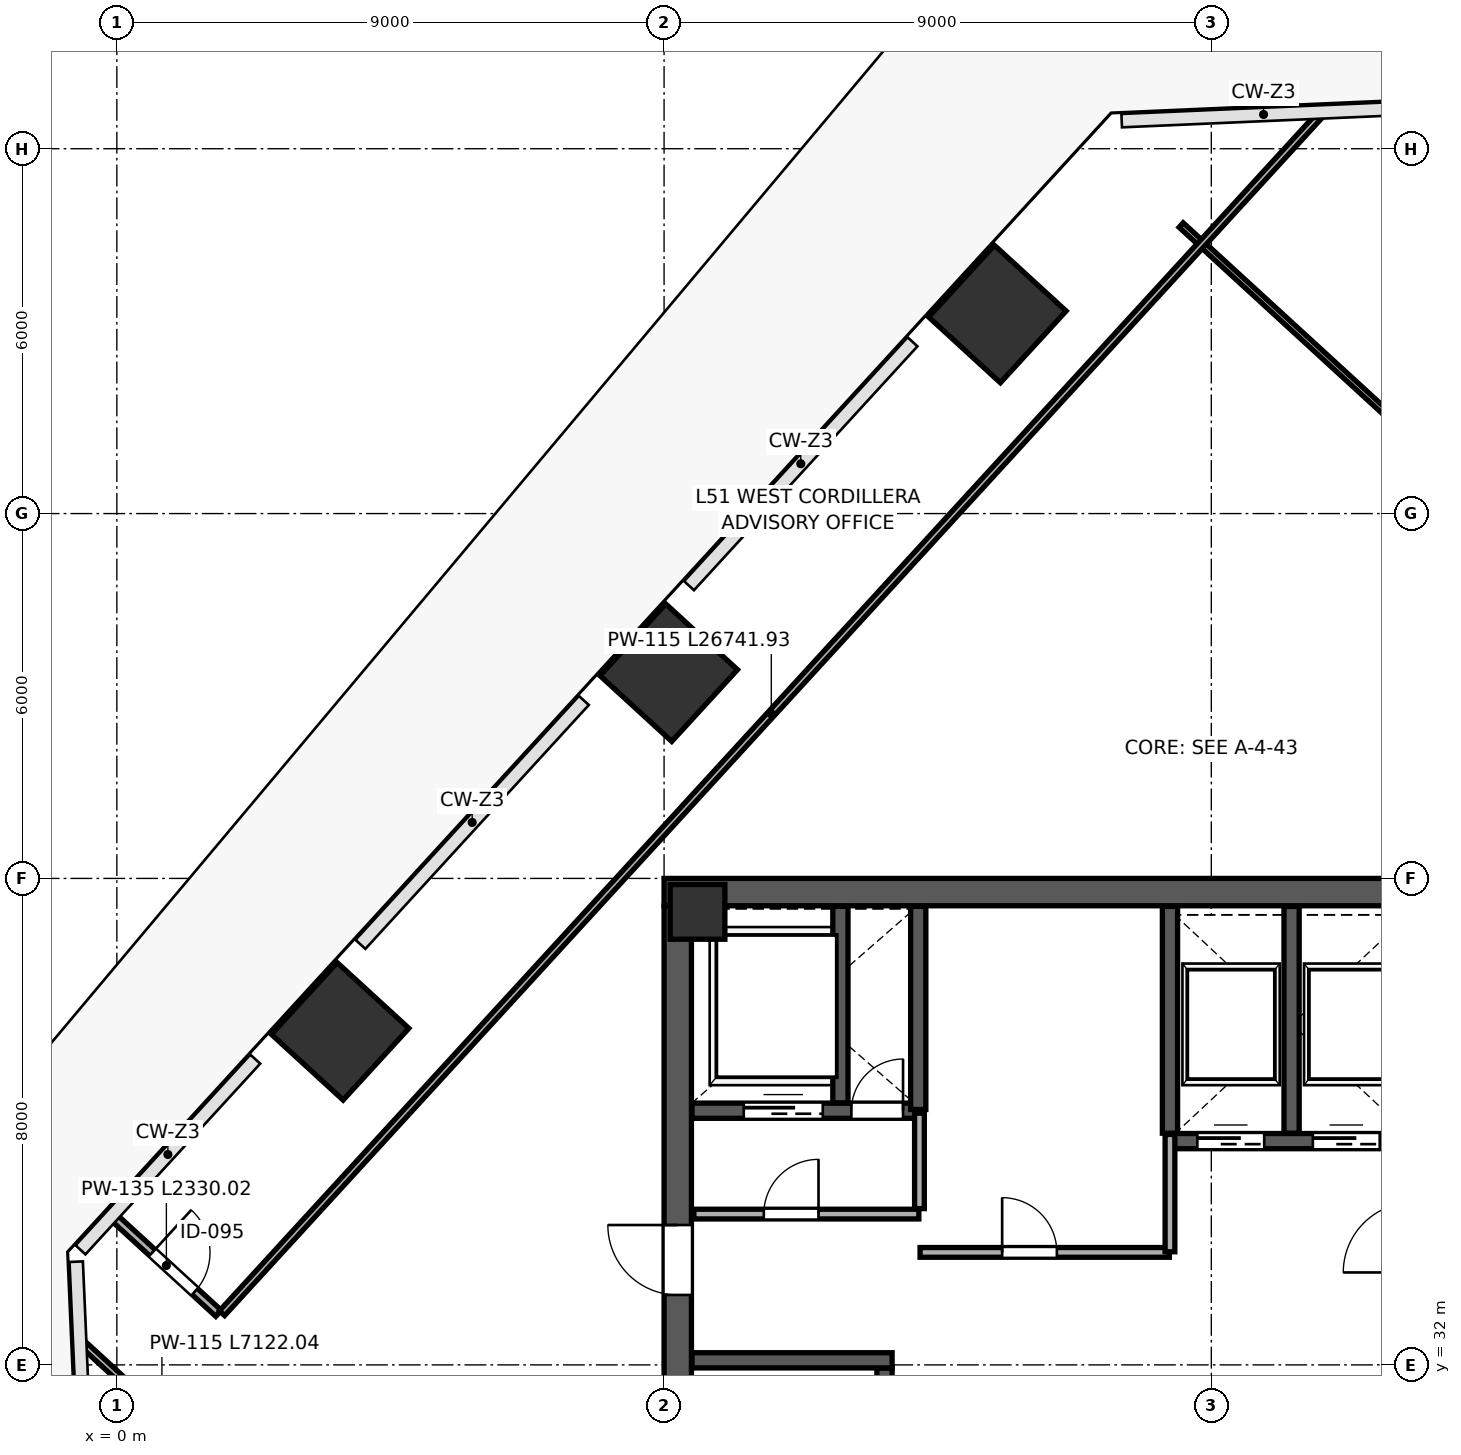
"""IFC4 building model, lengths in metres.
Left out: names, types, materials, properties, quantities, classifications, styles, units other than length and angle.
Written with IfcOpenShell. Run it as: python <this file> out.ifc"""

import sys

from ifc_helpers import new_model, si_unit, direction, frame, frame_2d, origin, origin_2d, place, context, subcontext, project, spatial, rectangle, extrude, source, transform, mapped, element, fill, save


model = new_model("IFC4")
c1 = context("Model", 3, precision=1e-05, world=origin(), true_north=direction((0.0, 1.0)))
c2 = subcontext(c1, "Body", "Model", "MODEL_VIEW")
j1 = project(units=[si_unit("LENGTHUNIT", "METRE"), si_unit("PLANEANGLEUNIT", "RADIAN")], contexts=[c1])
p1 = place(None, origin())
s1 = spatial("IfcSite", under=j1, at=p1, CompositionType="ELEMENT")
p2 = place(p1, origin())
s2 = spatial("IfcBuilding", under=s1, at=p2, CompositionType="ELEMENT")
p3 = place(p2, frame((0.0, 0.0, 229.0)))
s3 = spatial("IfcBuildingStorey", under=s2, at=p3, CompositionType="ELEMENT", Elevation=229.0)
m1 = source(origin(), c2, "Body", "SweptSolid", [
    extrude(rectangle(XDim=0.9, YDim=0.9, at=origin_2d()), origin(), (0.0, 0.0, 1.0), 4.198),
])
p4 = place(p3, frame((9.55, 39.45, 0.001), z_axis=(0.0, 0.0, 1.0), x_axis=(1.0, 0.0, 0.0)))
e1 = element("IfcColumn", 1, at=p4, inside=s3, PredefinedType="COLUMN", context=c2, shape_type="MappedRepresentation", body=[
    mapped(m1, transform((0.0, 0.0, 0.0), scale=1.0)),
])
m2 = source(origin(), c2, "Body", "SweptSolid", [
    extrude(rectangle(XDim=1.6, YDim=1.6, at=origin_2d()), origin(), (0.0, 0.0, 1.0), 4.198),
])
for number, where, z_axis, x_axis in (
    (2, (3.672, 37.486, 0.001), (0.0, 0.0, 1.0), (-0.737, 0.676, 0.0)),
    (3, (9.077, 43.384, 0.001), (0.0, 0.0, 1.0), (-0.737, 0.676, 0.0)),
    (4, (14.482, 49.282, 0.001), (0.0, 0.0, 1.0), (-0.737, 0.676, 0.0)),
):
    element("IfcColumn", number, at=place(p3, frame(where, z_axis=z_axis, x_axis=x_axis)), inside=s3, PredefinedType="COLUMN", context=c2, shape_type="MappedRepresentation", body=[
        mapped(m2, transform((0.0, 0.0, 0.0), scale=1.0)),
    ])
p5 = place(p3, frame((9.225, 24.45, 0.0), z_axis=(0.0, 0.0, 1.0), x_axis=(0.0, 1.0, 0.0)))
e5 = element("IfcWall", 5, at=p5, inside=s3, PredefinedType="SHEAR", context=c2, shape_type="SweptSolid", body=[
    extrude(rectangle(XDim=15.1, YDim=0.45, at=frame_2d((7.55, 0.0))), origin(), (0.0, 0.0, 1.0), 3.96),
])
p6 = place(p5, frame((8.7, 0.0, 0.0)))
e6 = element("IfcOpeningElement", 6, at=p6, cuts=e5, PredefinedType="OPENING", context=c2, shape_type="SweptSolid", body=[
    extrude(rectangle(XDim=1.15, YDim=2.2, at=frame_2d((0.575, 1.1))), frame((0.0, 0.235, 0.0), z_axis=(0.0, -1.0, 0.0), x_axis=(1.0, 0.0, 0.0)), (0.0, 0.0, 1.0), 0.47),
])
p7 = place(p3, frame((9.0, 39.775, 0.0), z_axis=(0.0, 0.0, 1.0), x_axis=(1.0, 0.0, 0.0)))
e7 = element("IfcWall", 7, at=p7, inside=s3, PredefinedType="SHEAR", context=c2, shape_type="SweptSolid", body=[
    extrude(rectangle(XDim=18.0, YDim=0.45, at=frame_2d((9.0, 0.0))), origin(), (0.0, 0.0, 1.0), 3.96),
])
p8 = place(p3, frame((12.625, 24.46, 0.0), z_axis=(0.0, 0.0, 1.0), x_axis=(0.0, 1.0, 0.0)))
e8 = element("IfcWall", 8, at=p8, inside=s3, PredefinedType="SHEAR", context=c2, shape_type="SweptSolid", body=[
    extrude(rectangle(XDim=7.49, YDim=0.25, at=frame_2d((3.745, 0.0))), origin(), (0.0, 0.0, 1.0), 3.96),
])
p9 = place(p8, frame((5.85, 0.0, 0.0)))
e9 = element("IfcOpeningElement", 9, at=p9, cuts=e8, PredefinedType="OPENING", context=c2, shape_type="SweptSolid", body=[
    extrude(rectangle(XDim=1.15, YDim=2.2, at=frame_2d((0.575, 1.1))), frame((0.0, 0.135, 0.0), z_axis=(0.0, -1.0, 0.0), x_axis=(1.0, 0.0, 0.0)), (0.0, 0.0, 1.0), 0.27),
])
p10 = place(p3, frame((9.46, 32.075, 0.0), z_axis=(0.0, 0.0, 1.0), x_axis=(1.0, 0.0, 0.0)))
e10 = element("IfcWall", 10, at=p10, inside=s3, PredefinedType="SHEAR", context=c2, shape_type="SweptSolid", body=[
    extrude(rectangle(XDim=3.29, YDim=0.25, at=frame_2d((1.645, 0.0))), origin(), (0.0, 0.0, 1.0), 3.96),
])
p11 = place(p3, frame((9.46, 36.18, 0.0), z_axis=(0.0, 0.0, 1.0), x_axis=(1.0, 0.0, 0.0)))
e11 = element("IfcWall", 11, at=p11, inside=s3, PredefinedType="SHEAR", context=c2, shape_type="SweptSolid", body=[
    extrude(rectangle(XDim=3.79, YDim=0.25, at=frame_2d((1.895, 0.0))), origin(), (0.0, 0.0, 1.0), 3.96),
])
p12 = place(p11, frame((2.62, 0.0, 0.0)))
e12 = element("IfcOpeningElement", 12, at=p12, cuts=e11, PredefinedType="OPENING", context=c2, shape_type="SweptSolid", body=[
    extrude(rectangle(XDim=0.85, YDim=2.1, at=frame_2d((0.425, 1.05))), frame((0.0, 0.135, 0.0), z_axis=(0.0, -1.0, 0.0), x_axis=(1.0, 0.0, 0.0)), (0.0, 0.0, 1.0), 0.27),
])
p13 = place(p11, frame((0.85, 0.0, 0.0)))
e13 = element("IfcOpeningElement", 13, at=p13, cuts=e11, PredefinedType="OPENING", context=c2, shape_type="SweptSolid", body=[
    extrude(rectangle(XDim=1.3, YDim=2.25, at=frame_2d((0.65, 1.125))), frame((0.0, 0.135, 0.0), z_axis=(0.0, -1.0, 0.0), x_axis=(1.0, 0.0, 0.0)), (0.0, 0.0, 1.0), 0.27),
])
p14 = place(p3, frame((11.9, 36.31, 0.0), z_axis=(0.0, 0.0, 1.0), x_axis=(0.0, 1.0, 0.0)))
e14 = element("IfcWall", 14, at=p14, inside=s3, PredefinedType="SHEAR", context=c2, shape_type="SweptSolid", body=[
    extrude(rectangle(XDim=3.23, YDim=0.25, at=frame_2d((1.615, 0.0))), origin(), (0.0, 0.0, 1.0), 3.96),
])
p15 = place(p3, frame((13.18, 36.2, 0.0), z_axis=(0.0, 0.0, 1.0), x_axis=(0.0, 1.0, 0.0)))
e15 = element("IfcWall", 15, at=p15, inside=s3, PredefinedType="SHEAR", context=c2, shape_type="SweptSolid", body=[
    extrude(rectangle(XDim=3.34, YDim=0.25, at=frame_2d((1.67, 0.0))), origin(), (0.0, 0.0, 1.0), 3.96),
])
p16 = place(p3, frame((17.32, 35.68, 0.0), z_axis=(0.0, 0.0, 1.0), x_axis=(1.0, 0.0, 0.0)))
e16 = element("IfcWall", 16, at=p16, inside=s3, PredefinedType="SHEAR", context=c2, shape_type="SweptSolid", body=[
    extrude(rectangle(XDim=3.87, YDim=0.25, at=frame_2d((1.935, 0.0))), origin(), (0.0, 0.0, 1.0), 3.96),
])
p17 = place(p16, frame((0.45, 0.0, 0.0)))
e17 = element("IfcOpeningElement", 17, at=p17, cuts=e16, PredefinedType="OPENING", context=c2, shape_type="SweptSolid", body=[
    extrude(rectangle(XDim=1.1, YDim=2.2, at=frame_2d((0.55, 1.1))), frame((0.0, 0.135, 0.0), z_axis=(0.0, -1.0, 0.0), x_axis=(1.0, 0.0, 0.0)), (0.0, 0.0, 1.0), 0.27),
])
p18 = place(p16, frame((2.35, 0.0, 0.0)))
e18 = element("IfcOpeningElement", 18, at=p18, cuts=e16, PredefinedType="OPENING", context=c2, shape_type="SweptSolid", body=[
    extrude(rectangle(XDim=1.1, YDim=2.2, at=frame_2d((0.55, 1.1))), frame((0.0, 0.135, 0.0), z_axis=(0.0, -1.0, 0.0), x_axis=(1.0, 0.0, 0.0)), (0.0, 0.0, 1.0), 0.27),
])
for number, where, z_axis, x_axis in (
    (19, (17.32, 35.81, 0.0), (0.0, 0.0, 1.0), (0.0, 1.0, 0.0)),
    (20, (19.32, 35.81, 0.0), (0.0, 0.0, 1.0), (0.0, 1.0, 0.0)),
):
    element("IfcWall", number, at=place(p3, frame(where, z_axis=z_axis, x_axis=x_axis)), inside=s3, PredefinedType="SHEAR", context=c2, shape_type="SweptSolid", body=[
        extrude(rectangle(XDim=3.73, YDim=0.25, at=frame_2d((1.865, 0.0))), origin(), (0.0, 0.0, 1.0), 3.96),
    ])
p19 = place(p3, frame((9.49, 34.48, 0.0), z_axis=(0.0, 0.0, 1.0), x_axis=(1.0, 0.0, 0.0)))
e21 = element("IfcWall", 21, at=p19, inside=s3, PredefinedType="PARTITIONING", context=c2, shape_type="SweptSolid", body=[
    extrude(rectangle(XDim=3.7, YDim=0.16, at=frame_2d((1.85, 0.0))), origin(), (0.0, 0.0, 1.0), 3.96),
])
p20 = place(p19, frame((1.15, 0.0, 0.0)))
e22 = element("IfcOpeningElement", 22, at=p20, cuts=e21, PredefinedType="OPENING", context=c2, shape_type="SweptSolid", body=[
    extrude(rectangle(XDim=0.9, YDim=2.15, at=frame_2d((0.45, 1.075))), frame((0.0, 0.09, 0.0), z_axis=(0.0, -1.0, 0.0), x_axis=(1.0, 0.0, 0.0)), (0.0, 0.0, 1.0), 0.18),
])
p21 = place(p3, frame((13.2, 34.57, 0.0), z_axis=(0.0, 0.0, 1.0), x_axis=(0.0, 1.0, 0.0)))
e23 = element("IfcWall", 23, at=p21, inside=s3, PredefinedType="PARTITIONING", context=c2, shape_type="SweptSolid", body=[
    extrude(rectangle(XDim=1.57, YDim=0.16, at=frame_2d((0.785, 0.0))), origin(), (0.0, 0.0, 1.0), 3.96),
])
p22 = place(p3, frame((13.21, 33.85, 0.0), z_axis=(0.0, 0.0, 1.0), x_axis=(1.0, 0.0, 0.0)))
e24 = element("IfcWall", 24, at=p22, inside=s3, PredefinedType="PARTITIONING", context=c2, shape_type="SweptSolid", body=[
    extrude(rectangle(XDim=4.1, YDim=0.16, at=frame_2d((2.05, 0.0))), origin(), (0.0, 0.0, 1.0), 3.96),
])
p23 = place(p22, frame((1.35, 0.0, 0.0)))
e25 = element("IfcOpeningElement", 25, at=p23, cuts=e24, PredefinedType="OPENING", context=c2, shape_type="SweptSolid", body=[
    extrude(rectangle(XDim=0.9, YDim=2.15, at=frame_2d((0.45, 1.075))), frame((0.0, 0.09, 0.0), z_axis=(0.0, -1.0, 0.0), x_axis=(1.0, 0.0, 0.0)), (0.0, 0.0, 1.0), 0.18),
])
p24 = place(p3, frame((17.32, 33.86, 0.0), z_axis=(0.0, 0.0, 1.0), x_axis=(0.0, 1.0, 0.0)))
e26 = element("IfcWall", 26, at=p24, inside=s3, PredefinedType="PARTITIONING", context=c2, shape_type="SweptSolid", body=[
    extrude(rectangle(XDim=1.93, YDim=0.16, at=frame_2d((0.965, 0.0))), origin(), (0.0, 0.0, 1.0), 3.96),
])
p25 = place(p3, frame((-0.571, 32.354, 0.0), z_axis=(0.0, 0.0, 1.0), x_axis=(0.737285035525, -0.675581805846, 0.0)))
e27 = element("IfcWall", 27, at=p25, inside=s3, PredefinedType="PARTITIONING", context=c2, shape_type="SweptSolid", body=[
    extrude(rectangle(XDim=7.122, YDim=0.115, at=frame_2d((3.561, 0.0))), origin(), (0.0, 0.0, 1.0), 3.96),
])
p26 = place(p25, frame((2.6, 0.0, 0.0)))
e28 = element("IfcOpeningElement", 28, at=p26, cuts=e27, PredefinedType="OPENING", context=c2, shape_type="SweptSolid", body=[
    extrude(rectangle(XDim=0.9, YDim=2.15, at=frame_2d((0.45, 1.075))), frame((0.0, 0.067, 0.0), z_axis=(0.0, -1.0, 0.0), x_axis=(1.0, 0.0, 0.0)), (0.0, 0.0, 1.0), 0.135),
])
p27 = place(p25, frame((4.7, 0.0, 0.0)))
e29 = element("IfcOpeningElement", 29, at=p27, cuts=e27, PredefinedType="OPENING", context=c2, shape_type="SweptSolid", body=[
    extrude(rectangle(XDim=0.95, YDim=2.15, at=frame_2d((0.475, 1.075))), frame((0.0, 0.067, 0.0), z_axis=(0.0, -1.0, 0.0), x_axis=(1.0, 0.0, 0.0)), (0.0, 0.0, 1.0), 0.135),
])
p28 = place(p3, frame((17.504, 50.744, 0.0), z_axis=(0.0, 0.0, 1.0), x_axis=(0.737277850523, -0.675589646996, 0.0)))
e30 = element("IfcWall", 30, at=p28, inside=s3, PredefinedType="PARTITIONING", context=c2, shape_type="SweptSolid", body=[
    extrude(rectangle(XDim=21.87, YDim=0.1, at=frame_2d((10.935, 0.0))), origin(), (0.0, 0.0, 1.0), 3.96),
])
p29 = place(p28, frame((5.4, 0.0, 0.0)))
e31 = element("IfcOpeningElement", 31, at=p29, cuts=e30, PredefinedType="OPENING", context=c2, shape_type="SweptSolid", body=[
    extrude(rectangle(XDim=0.95, YDim=2.15, at=frame_2d((0.475, 1.075))), frame((0.0, 0.06, 0.0), z_axis=(0.0, -1.0, 0.0), x_axis=(1.0, 0.0, 0.0)), (0.0, 0.0, 1.0), 0.12),
])
p30 = place(p3, frame((-0.044, 34.421, 0.0), z_axis=(0.0, 0.0, 1.0), x_axis=(0.73728894688, -0.675577537229, 0.0)))
e32 = element("IfcWall", 32, at=p30, inside=s3, PredefinedType="PARTITIONING", context=c2, shape_type="SweptSolid", body=[
    extrude(rectangle(XDim=2.33, YDim=0.135, at=frame_2d((1.165, 0.0))), origin(), (0.0, 0.0, 1.0), 3.96),
])
p31 = place(p30, frame((0.85, 0.0, 0.0)))
e33 = element("IfcOpeningElement", 33, at=p31, cuts=e32, PredefinedType="OPENING", context=c2, shape_type="SweptSolid", body=[
    extrude(rectangle(XDim=0.95, YDim=2.15, at=frame_2d((0.475, 1.075))), frame((0.0, 0.078, 0.0), z_axis=(0.0, -1.0, 0.0), x_axis=(1.0, 0.0, 0.0)), (0.0, 0.0, 1.0), 0.155),
])
p32 = place(p3, frame((1.73, 32.85, 0.0), z_axis=(0.0, 0.0, 1.0), x_axis=(0.675589845589, 0.737277668546, 0.0)))
e34 = element("IfcWall", 34, at=p32, inside=s3, PredefinedType="PARTITIONING", context=c2, shape_type="SweptSolid", body=[
    extrude(rectangle(XDim=26.742, YDim=0.115, at=frame_2d((13.371, 0.0))), origin(), (0.0, 0.0, 1.0), 3.96),
])
m3 = source(origin(), c2, "Body", "SweptSolid", [
    extrude(rectangle(XDim=1.15, YDim=2.2, at=frame_2d((0.575, 1.1))), frame((0.0, 0.025, 0.0), z_axis=(0.0, -1.0, 0.0), x_axis=(1.0, 0.0, 0.0)), (0.0, 0.0, 1.0), 0.05),
])
p33 = place(p6, origin())
e35 = element("IfcDoor", 35, at=p33, inside=s3, OperationType="SINGLE_SWING_RIGHT", PredefinedType="DOOR", context=c2, shape_type="MappedRepresentation", body=[
    mapped(m3, transform((0.0, 0.0, 0.0), scale=1.0)),
])
fill(e6, e35)
m4 = source(origin(), c2, "Body", "SweptSolid", [
    extrude(rectangle(XDim=0.85, YDim=2.1, at=frame_2d((0.425, 1.05))), frame((0.0, 0.025, 0.0), z_axis=(0.0, -1.0, 0.0), x_axis=(1.0, 0.0, 0.0)), (0.0, 0.0, 1.0), 0.05),
])
p34 = place(p12, origin())
e36 = element("IfcDoor", 36, at=p34, inside=s3, OperationType="SINGLE_SWING_RIGHT", PredefinedType="DOOR", context=c2, shape_type="MappedRepresentation", body=[
    mapped(m4, transform((0.0, 0.0, 0.0), scale=1.0)),
])
fill(e12, e36)
m5 = source(origin(), c2, "Body", "SweptSolid", [
    extrude(rectangle(XDim=1.1, YDim=2.2, at=frame_2d((0.55, 1.1))), frame((0.0, 0.025, 0.0), z_axis=(0.0, -1.0, 0.0), x_axis=(1.0, 0.0, 0.0)), (0.0, 0.0, 1.0), 0.05),
])
p35 = place(p17, origin())
e37 = element("IfcDoor", 37, at=p35, inside=s3, OperationType="SLIDING_TO_LEFT", PredefinedType="DOOR", context=c2, shape_type="MappedRepresentation", body=[
    mapped(m5, transform((0.0, 0.0, 0.0), scale=1.0)),
])
fill(e17, e37)
p36 = place(p18, origin())
e38 = element("IfcDoor", 38, at=p36, inside=s3, OperationType="SLIDING_TO_RIGHT", PredefinedType="DOOR", context=c2, shape_type="MappedRepresentation", body=[
    mapped(m5, transform((0.0, 0.0, 0.0), scale=1.0)),
])
fill(e18, e38)
m6 = source(origin(), c2, "Body", "SweptSolid", [
    extrude(rectangle(XDim=1.3, YDim=2.25, at=frame_2d((0.65, 1.125))), frame((0.0, 0.025, 0.0), z_axis=(0.0, -1.0, 0.0), x_axis=(1.0, 0.0, 0.0)), (0.0, 0.0, 1.0), 0.05),
])
p37 = place(p13, origin())
e39 = element("IfcDoor", 39, at=p37, inside=s3, OperationType="SLIDING_TO_LEFT", PredefinedType="DOOR", context=c2, shape_type="MappedRepresentation", body=[
    mapped(m6, transform((0.0, 0.0, 0.0), scale=1.0)),
])
fill(e13, e39)
m7 = source(origin(), c2, "Body", "SweptSolid", [
    extrude(rectangle(XDim=0.9, YDim=2.15, at=frame_2d((0.45, 1.075))), frame((0.0, 0.025, 0.0), z_axis=(0.0, -1.0, 0.0), x_axis=(1.0, 0.0, 0.0)), (0.0, 0.0, 1.0), 0.05),
])
p38 = place(p20, origin())
e40 = element("IfcDoor", 40, at=p38, inside=s3, OperationType="SINGLE_SWING_RIGHT", PredefinedType="DOOR", context=c2, shape_type="MappedRepresentation", body=[
    mapped(m7, transform((0.0, 0.0, 0.0), scale=1.0)),
])
fill(e22, e40)
p39 = place(p23, origin())
e41 = element("IfcDoor", 41, at=p39, inside=s3, OperationType="SINGLE_SWING_LEFT", PredefinedType="DOOR", context=c2, shape_type="MappedRepresentation", body=[
    mapped(m7, transform((0.0, 0.0, 0.0), scale=1.0)),
])
fill(e25, e41)
m8 = source(origin(), c2, "Body", "SweptSolid", [
    extrude(rectangle(XDim=0.95, YDim=2.15, at=frame_2d((0.475, 1.075))), frame((0.0, 0.025, 0.0), z_axis=(0.0, -1.0, 0.0), x_axis=(1.0, 0.0, 0.0)), (0.0, 0.0, 1.0), 0.05),
])
p40 = place(p31, origin())
e42 = element("IfcDoor", 42, at=p40, inside=s3, OperationType="SINGLE_SWING_LEFT", PredefinedType="DOOR", context=c2, shape_type="MappedRepresentation", body=[
    mapped(m8, transform((0.0, 0.0, 0.0), scale=1.0)),
])
fill(e33, e42)
save(model, sys.argv[1])
